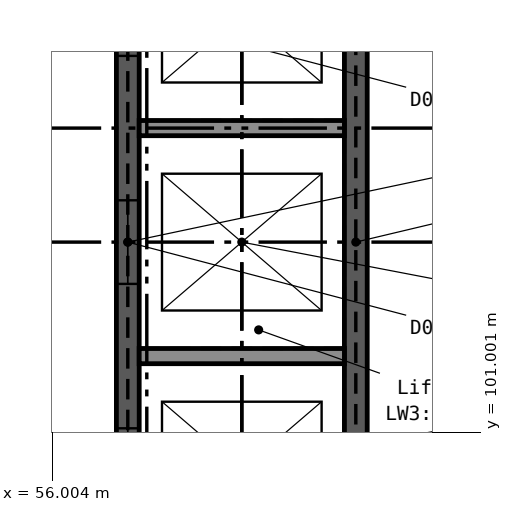
"""IFC4 building model, lengths in metres.
Left out: names, types, materials, properties, quantities, classifications, styles, units other than length and angle.
Written with IfcOpenShell. Run it as: python <this file> out.ifc"""

import sys

from ifc_helpers import new_model, si_unit, direction, frame, frame_2d, origin, place, context, subcontext, project, spatial, rectangle, extrude, element, fill, save


model = new_model("IFC4")
c1 = context("Model", 3, precision=1e-05, world=origin(), true_north=direction((0.0, 1.0)))
c2 = subcontext(c1, "Body", "Model", "MODEL_VIEW")
j1 = project(units=[si_unit("LENGTHUNIT", "METRE"), si_unit("PLANEANGLEUNIT", "RADIAN")], contexts=[c1])
p1 = place(None, origin())
s1 = spatial("IfcSite", under=j1, at=p1, CompositionType="ELEMENT")
p2 = place(p1, origin())
s2 = spatial("IfcBuilding", under=s1, at=p2, CompositionType="ELEMENT")
p3 = place(p2, origin())
s3 = spatial("IfcBuildingStorey", under=s2, at=p3, CompositionType="ELEMENT", Elevation=0.0)
p4 = place(p3, frame((57.0, 99.15, -1.9), z_axis=(0.0, 0.0, 1.0), x_axis=(0.0, 1.0, 0.0)))
e1 = element("IfcWall", 1, at=p4, inside=s3, PredefinedType="SHEAR", context=c2, shape_type="SweptSolid", body=[
    extrude(rectangle(XDim=8.7, YDim=0.3, at=frame_2d((4.35, 0.0))), origin(), (0.0, 0.0, 1.0), 7.3),
])
p5 = place(p4, frame((0.8, 0.0, 1.9)))
e2 = element("IfcOpeningElement", 2, at=p5, cuts=e1, PredefinedType="OPENING", context=c2, shape_type="SweptSolid", body=[
    extrude(rectangle(XDim=1.1, YDim=2.1, at=frame_2d((0.55, 1.05))), frame((0.0, 0.161, 0.0), z_axis=(0.0, -1.0, 0.0), x_axis=(1.0, 0.0, 0.0)), (0.0, 0.0, 1.0), 0.322),
])
p6 = place(p4, frame((3.8, 0.0, 1.9)))
e3 = element("IfcOpeningElement", 3, at=p6, cuts=e1, PredefinedType="OPENING", context=c2, shape_type="SweptSolid", body=[
    extrude(rectangle(XDim=1.1, YDim=2.1, at=frame_2d((0.55, 1.05))), frame((0.0, 0.161, 0.0), z_axis=(0.0, -1.0, 0.0), x_axis=(1.0, 0.0, 0.0)), (0.0, 0.0, 1.0), 0.322),
])
p7 = place(p4, frame((6.8, 0.0, 1.9)))
e4 = element("IfcOpeningElement", 4, at=p7, cuts=e1, PredefinedType="OPENING", context=c2, shape_type="SweptSolid", body=[
    extrude(rectangle(XDim=1.1, YDim=2.1, at=frame_2d((0.55, 1.05))), frame((0.0, 0.161, 0.0), z_axis=(0.0, -1.0, 0.0), x_axis=(1.0, 0.0, 0.0)), (0.0, 0.0, 1.0), 0.322),
])
p8 = place(p3, frame((60.0, 99.15, -1.9), z_axis=(0.0, 0.0, 1.0), x_axis=(0.0, 1.0, 0.0)))
e5 = element("IfcWall", 5, at=p8, inside=s3, PredefinedType="SHEAR", context=c2, shape_type="SweptSolid", body=[
    extrude(rectangle(XDim=8.7, YDim=0.3, at=frame_2d((4.35, 0.0))), origin(), (0.0, 0.0, 1.0), 7.3),
])
for number, where, z_axis, x_axis in (
    (6, (57.15, 102.0, -1.9), (0.0, 0.0, 1.0), (1.0, 0.0, 0.0)),
    (7, (57.15, 105.0, -1.9), (0.0, 0.0, 1.0), (1.0, 0.0, 0.0)),
):
    element("IfcWall", number, at=place(p3, frame(where, z_axis=z_axis, x_axis=x_axis)), inside=s3, PredefinedType="SOLIDWALL", context=c2, shape_type="SweptSolid", body=[
        extrude(rectangle(XDim=2.7, YDim=0.2, at=frame_2d((1.35, 0.0))), origin(), (0.0, 0.0, 1.0), 7.3),
    ])
p9 = place(p5, origin())
e8 = element("IfcDoor", 8, at=p9, inside=s3, OperationType="DOUBLE_DOOR_SLIDING", PredefinedType="DOOR", context=c2, shape_type="SweptSolid", body=[
    extrude(rectangle(XDim=1.1, YDim=2.1, at=frame_2d((0.55, 1.05))), frame((0.0, 0.025, 0.0), z_axis=(0.0, -1.0, 0.0), x_axis=(1.0, 0.0, 0.0)), (0.0, 0.0, 1.0), 0.05),
])
fill(e2, e8)
p10 = place(p6, origin())
e9 = element("IfcDoor", 9, at=p10, inside=s3, OperationType="DOUBLE_DOOR_SLIDING", PredefinedType="DOOR", context=c2, shape_type="SweptSolid", body=[
    extrude(rectangle(XDim=1.1, YDim=2.1, at=frame_2d((0.55, 1.05))), frame((0.0, 0.025, 0.0), z_axis=(0.0, -1.0, 0.0), x_axis=(1.0, 0.0, 0.0)), (0.0, 0.0, 1.0), 0.05),
])
fill(e3, e9)
p11 = place(p7, origin())
e10 = element("IfcDoor", 10, at=p11, inside=s3, OperationType="DOUBLE_DOOR_SLIDING", PredefinedType="DOOR", context=c2, shape_type="SweptSolid", body=[
    extrude(rectangle(XDim=1.1, YDim=2.1, at=frame_2d((0.55, 1.05))), frame((0.0, 0.025, 0.0), z_axis=(0.0, -1.0, 0.0), x_axis=(1.0, 0.0, 0.0)), (0.0, 0.0, 1.0), 0.05),
])
fill(e4, e10)
save(model, sys.argv[1])
